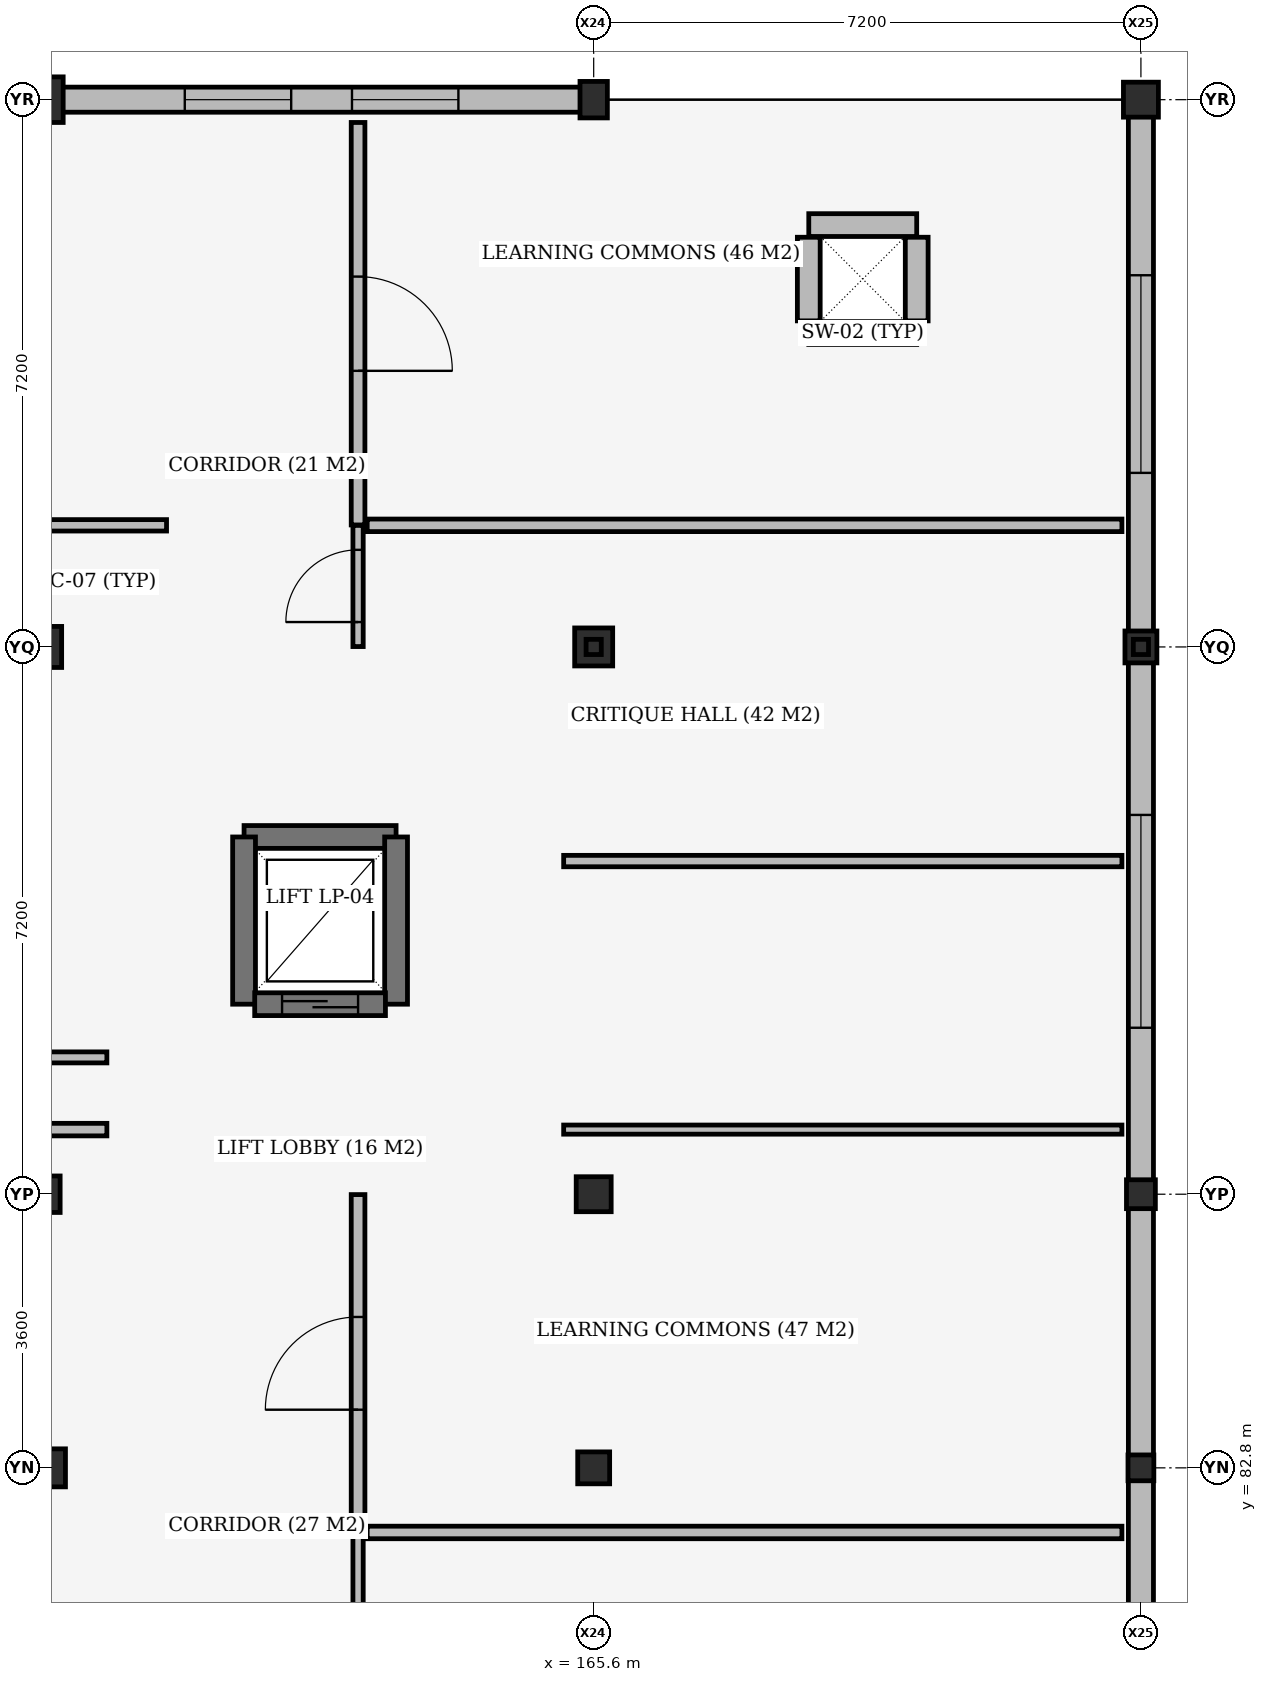
"""IFC4 building model, lengths in metres.
Left out: names, types, materials, properties, quantities, classifications, styles, units other than length and angle.
Written with IfcOpenShell. Run it as: python <this file> out.ifc"""

import sys

from ifc_helpers import new_model, si_unit, direction, frame, frame_2d, origin, origin_2d, place, context, subcontext, project, spatial, rectangle, i_section, extrude, element, fill, save


model = new_model("IFC4")
c1 = context("Model", 3, precision=1e-05, world=origin(), true_north=direction((0.0, 1.0)))
c2 = subcontext(c1, "Body", "Model", "MODEL_VIEW")
j1 = project(units=[si_unit("LENGTHUNIT", "METRE"), si_unit("PLANEANGLEUNIT", "RADIAN")], contexts=[c1])
p1 = place(None, origin())
s1 = spatial("IfcSite", under=j1, at=p1, CompositionType="ELEMENT")
p2 = place(p1, origin())
s2 = spatial("IfcBuilding", under=s1, at=p2, CompositionType="ELEMENT")
p3 = place(p2, frame((0.0, 0.0, 18.0)))
s3 = spatial("IfcBuildingStorey", under=s2, at=p3, CompositionType="ELEMENT", Elevation=18.0)
p4 = place(p3, frame((168.43, 97.73, 0.0), z_axis=(0.0, 0.0, 1.0), x_axis=(1.0, 0.0, 0.0)))
e1 = element("IfcWall", 1, at=p4, inside=s3, PredefinedType="SHEAR", context=c2, shape_type="SweptSolid", body=[
    extrude(rectangle(XDim=1.42, YDim=0.3, at=frame_2d((0.71, 0.0))), origin(), (0.0, 0.0, 1.0), 3.96),
])
p5 = place(p3, frame((169.85, 97.89, 0.0), z_axis=(0.0, 0.0, 1.0), x_axis=(0.0, 1.0, 0.0)))
e2 = element("IfcWall", 2, at=p5, inside=s3, PredefinedType="SHEAR", context=c2, shape_type="SweptSolid", body=[
    extrude(rectangle(XDim=1.1, YDim=0.3, at=frame_2d((0.55, 0.0))), origin(), (0.0, 0.0, 1.0), 3.96),
])
p6 = place(p3, frame((169.85, 99.15, 0.0), z_axis=(0.0, 0.0, 1.0), x_axis=(-1.0, 0.0, 0.0)))
e3 = element("IfcWall", 3, at=p6, inside=s3, PredefinedType="SHEAR", context=c2, shape_type="SweptSolid", body=[
    extrude(rectangle(XDim=1.42, YDim=0.3, at=frame_2d((0.71, 0.0))), origin(), (0.0, 0.0, 1.0), 3.96),
])
p7 = place(p3, frame((168.43, 98.99, 0.0), z_axis=(0.0, 0.0, 1.0), x_axis=(0.0, -1.0, 0.0)))
e4 = element("IfcWall", 4, at=p7, inside=s3, PredefinedType="SHEAR", context=c2, shape_type="SweptSolid", body=[
    extrude(rectangle(XDim=1.1, YDim=0.3, at=frame_2d((0.55, 0.0))), origin(), (0.0, 0.0, 1.0), 3.96),
])
p8 = place(p3, frame((158.4, 82.8, 0.0), z_axis=(0.0, 0.0, 1.0), x_axis=(1.0, 0.0, 0.0)))
e5 = element("IfcColumn", 5, at=p8, inside=s3, PredefinedType="COLUMN", context=c2, shape_type="SweptSolid", body=[
    extrude(rectangle(XDim=0.5, YDim=0.5, at=origin_2d()), origin(), (0.0, 0.0, 1.0), 3.96),
])
p9 = place(p3, frame((158.4, 86.4, 0.0), z_axis=(0.0, 0.0, 1.0), x_axis=(1.0, 0.0, 0.0)))
e6 = element("IfcColumn", 6, at=p9, inside=s3, PredefinedType="COLUMN", context=c2, shape_type="SweptSolid", body=[
    extrude(rectangle(XDim=0.36, YDim=0.48, at=origin_2d()), origin(), (0.0, 0.0, 1.0), 3.96),
])
p10 = place(p3, frame((158.4, 93.6, 0.0), z_axis=(0.0, 0.0, 1.0), x_axis=(1.0, 0.0, 0.0)))
e7 = element("IfcColumn", 7, at=p10, inside=s3, PredefinedType="COLUMN", context=c2, shape_type="SweptSolid", body=[
    extrude(rectangle(XDim=0.4, YDim=0.54, at=origin_2d()), origin(), (0.0, 0.0, 1.0), 3.96),
])
p11 = place(p3, frame((158.4, 100.8, 0.0), z_axis=(0.0, 0.0, 1.0), x_axis=(1.0, 0.0, 0.0)))
e8 = element("IfcColumn", 8, at=p11, inside=s3, PredefinedType="COLUMN", context=c2, shape_type="SweptSolid", body=[
    extrude(rectangle(XDim=0.44, YDim=0.6, at=origin_2d()), origin(), (0.0, 0.0, 1.0), 3.96),
])
p12 = place(p3, frame((165.6, 82.8, 0.0), z_axis=(0.0, 0.0, 1.0), x_axis=(1.0, 0.0, 0.0)))
e9 = element("IfcColumn", 9, at=p12, inside=s3, PredefinedType="COLUMN", context=c2, shape_type="SweptSolid", body=[
    extrude(rectangle(XDim=0.42, YDim=0.42, at=origin_2d()), origin(), (0.0, 0.0, 1.0), 3.96),
])
p13 = place(p3, frame((165.6, 86.4, 0.0), z_axis=(0.0, 0.0, 1.0), x_axis=(1.0, 0.0, 0.0)))
e10 = element("IfcColumn", 10, at=p13, inside=s3, PredefinedType="COLUMN", context=c2, shape_type="SweptSolid", body=[
    extrude(rectangle(XDim=0.46, YDim=0.46, at=origin_2d()), origin(), (0.0, 0.0, 1.0), 3.96),
])
p14 = place(p3, frame((165.6, 93.6, 0.0), z_axis=(0.0, 0.0, 1.0), x_axis=(1.0, 0.0, 0.0)))
e11 = element("IfcColumn", 11, at=p14, inside=s3, PredefinedType="COLUMN", context=c2, shape_type="SweptSolid", body=[
    extrude(rectangle(XDim=0.5, YDim=0.5, at=origin_2d()), origin(), (0.0, 0.0, 1.0), 3.96),
])
p15 = place(p3, frame((165.6, 100.8, 0.0), z_axis=(0.0, 0.0, 1.0), x_axis=(1.0, 0.0, 0.0)))
e12 = element("IfcColumn", 12, at=p15, inside=s3, PredefinedType="COLUMN", context=c2, shape_type="SweptSolid", body=[
    extrude(rectangle(XDim=0.36, YDim=0.48, at=origin_2d()), origin(), (0.0, 0.0, 1.0), 3.96),
])
p16 = place(p3, frame((172.8, 82.8, 0.0), z_axis=(0.0, 0.0, 1.0), x_axis=(1.0, 0.0, 0.0)))
e13 = element("IfcColumn", 13, at=p16, inside=s3, PredefinedType="COLUMN", context=c2, shape_type="SweptSolid", body=[
    extrude(rectangle(XDim=0.34, YDim=0.34, at=origin_2d()), origin(), (0.0, 0.0, 1.0), 3.96),
])
p17 = place(p3, frame((172.8, 86.4, 0.0), z_axis=(0.0, 0.0, 1.0), x_axis=(1.0, 0.0, 0.0)))
e14 = element("IfcColumn", 14, at=p17, inside=s3, PredefinedType="COLUMN", context=c2, shape_type="SweptSolid", body=[
    extrude(rectangle(XDim=0.38, YDim=0.38, at=origin_2d()), origin(), (0.0, 0.0, 1.0), 3.96),
])
p18 = place(p3, frame((172.8, 93.6, 0.0), z_axis=(0.0, 0.0, 1.0), x_axis=(1.0, 0.0, 0.0)))
e15 = element("IfcColumn", 15, at=p18, inside=s3, PredefinedType="COLUMN", context=c2, shape_type="SweptSolid", body=[
    extrude(rectangle(XDim=0.42, YDim=0.42, at=origin_2d()), origin(), (0.0, 0.0, 1.0), 3.96),
])
p19 = place(p3, frame((172.8, 100.8, 0.0), z_axis=(0.0, 0.0, 1.0), x_axis=(1.0, 0.0, 0.0)))
e16 = element("IfcColumn", 16, at=p19, inside=s3, PredefinedType="COLUMN", context=c2, shape_type="SweptSolid", body=[
    extrude(rectangle(XDim=0.46, YDim=0.46, at=origin_2d()), origin(), (0.0, 0.0, 1.0), 3.96),
])
p20 = place(p3, frame((163.0, 91.1, 0.0), z_axis=(0.0, 0.0, 1.0), x_axis=(-1.0, 0.0, 0.0)))
e17 = element("IfcWall", 17, at=p20, inside=s3, PredefinedType="SHEAR", context=c2, shape_type="SweptSolid", body=[
    extrude(rectangle(XDim=2.0, YDim=0.3, at=frame_2d((1.0, 0.0))), origin(), (0.0, 0.0, 1.0), 3.64),
])
for number, where, z_axis, x_axis in (
    (18, (161.0, 91.1, 0.0), (0.0, 0.0, 1.0), (0.0, -1.0, 0.0)),
    (19, (163.0, 88.9, 0.0), (0.0, 0.0, 1.0), (0.0, 1.0, 0.0)),
):
    element("IfcWall", number, at=place(p3, frame(where, z_axis=z_axis, x_axis=x_axis)), inside=s3, PredefinedType="SHEAR", context=c2, shape_type="SweptSolid", body=[
        extrude(rectangle(XDim=2.2, YDim=0.3, at=frame_2d((1.1, 0.0))), origin(), (0.0, 0.0, 1.0), 3.64),
    ])
for number, where, z_axis, x_axis in (
    (20, (165.6, 93.6, 3.96), (0.0, 0.0, 1.0), (1.0, 0.0, 0.0)),
    (21, (172.8, 93.6, 3.96), (0.0, 0.0, 1.0), (1.0, 0.0, 0.0)),
):
    element("IfcColumn", number, at=place(p3, frame(where, z_axis=z_axis, x_axis=x_axis)), inside=s3, PredefinedType="COLUMN", context=c2, shape_type="SweptSolid", body=[
        extrude(i_section(OverallWidth=0.2, OverallDepth=0.2, WebThickness=0.009, FlangeThickness=0.015, FilletRadius=0.018, at=origin_2d()), origin(), (0.0, 0.0, 1.0), 2.04),
    ])
p21 = place(p3, frame((158.612, 100.8, 0.0), z_axis=(0.0, 0.0, 1.0), x_axis=(1.0, 0.0, 0.0)))
e22 = element("IfcWall", 22, at=p21, inside=s3, PredefinedType="STANDARD", context=c2, shape_type="SweptSolid", body=[
    extrude(rectangle(XDim=6.816, YDim=0.33, at=frame_2d((3.408, 0.0))), origin(), (0.0, 0.0, 1.0), 3.96),
])
p22 = place(p21, frame((1.608, 0.0, 0.85)))
e23 = element("IfcOpeningElement", 23, at=p22, cuts=e22, PredefinedType="OPENING", context=c2, shape_type="SweptSolid", body=[
    extrude(rectangle(XDim=1.4, YDim=2.6, at=frame_2d((0.7, 1.3))), frame((0.0, 0.175, 0.0), z_axis=(0.0, -1.0, 0.0), x_axis=(1.0, 0.0, 0.0)), (0.0, 0.0, 1.0), 0.35),
])
p23 = place(p21, frame((3.808, 0.0, 0.85)))
e24 = element("IfcOpeningElement", 24, at=p23, cuts=e22, PredefinedType="OPENING", context=c2, shape_type="SweptSolid", body=[
    extrude(rectangle(XDim=1.4, YDim=2.6, at=frame_2d((0.7, 1.3))), frame((0.0, 0.175, 0.0), z_axis=(0.0, -1.0, 0.0), x_axis=(1.0, 0.0, 0.0)), (0.0, 0.0, 1.0), 0.35),
])
p24 = place(p3, frame((172.8, 82.638, 0.0), z_axis=(0.0, 0.0, 1.0), x_axis=(0.0, -1.0, 0.0)))
e25 = element("IfcWall", 25, at=p24, inside=s3, PredefinedType="STANDARD", context=c2, shape_type="SweptSolid", body=[
    extrude(rectangle(XDim=6.746, YDim=0.33, at=frame_2d((3.373, 0.0))), origin(), (0.0, 0.0, 1.0), 3.96),
])
p25 = place(p24, frame((2.073, 0.0, 0.85)))
e26 = element("IfcOpeningElement", 26, at=p25, cuts=e25, PredefinedType="OPENING", context=c2, shape_type="SweptSolid", body=[
    extrude(rectangle(XDim=2.6, YDim=2.4, at=frame_2d((1.3, 1.2))), frame((0.0, 0.175, 0.0), z_axis=(0.0, -1.0, 0.0), x_axis=(1.0, 0.0, 0.0)), (0.0, 0.0, 1.0), 0.35),
])
p26 = place(p3, frame((172.8, 86.218, 0.0), z_axis=(0.0, 0.0, 1.0), x_axis=(0.0, -1.0, 0.0)))
e27 = element("IfcWall", 27, at=p26, inside=s3, PredefinedType="STANDARD", context=c2, shape_type="SweptSolid", body=[
    extrude(rectangle(XDim=3.256, YDim=0.33, at=frame_2d((1.628, 0.0))), origin(), (0.0, 0.0, 1.0), 3.96),
])
p27 = place(p3, frame((172.8, 93.398, 0.0), z_axis=(0.0, 0.0, 1.0), x_axis=(0.0, -1.0, 0.0)))
e28 = element("IfcWall", 28, at=p27, inside=s3, PredefinedType="STANDARD", context=c2, shape_type="SweptSolid", body=[
    extrude(rectangle(XDim=6.816, YDim=0.33, at=frame_2d((3.408, 0.0))), origin(), (0.0, 0.0, 1.0), 3.96),
])
p28 = place(p27, frame((2.008, 0.0, 0.85)))
e29 = element("IfcOpeningElement", 29, at=p28, cuts=e28, PredefinedType="OPENING", context=c2, shape_type="SweptSolid", body=[
    extrude(rectangle(XDim=2.8, YDim=2.4, at=frame_2d((1.4, 1.2))), frame((0.0, 0.175, 0.0), z_axis=(0.0, -1.0, 0.0), x_axis=(1.0, 0.0, 0.0)), (0.0, 0.0, 1.0), 0.35),
])
p29 = place(p3, frame((172.8, 100.578, 0.0), z_axis=(0.0, 0.0, 1.0), x_axis=(0.0, -1.0, 0.0)))
e30 = element("IfcWall", 30, at=p29, inside=s3, PredefinedType="STANDARD", context=c2, shape_type="SweptSolid", body=[
    extrude(rectangle(XDim=6.776, YDim=0.33, at=frame_2d((3.388, 0.0))), origin(), (0.0, 0.0, 1.0), 3.96),
])
p30 = place(p29, frame((2.088, 0.0, 0.85)))
e31 = element("IfcOpeningElement", 31, at=p30, cuts=e30, PredefinedType="OPENING", context=c2, shape_type="SweptSolid", body=[
    extrude(rectangle(XDim=2.6, YDim=2.4, at=frame_2d((1.3, 1.2))), frame((0.0, 0.175, 0.0), z_axis=(0.0, -1.0, 0.0), x_axis=(1.0, 0.0, 0.0)), (0.0, 0.0, 1.0), 0.35),
])
p31 = place(p3, frame((162.86, 88.9, 0.0), z_axis=(0.0, 0.0, 1.0), x_axis=(-1.0, 0.0, 0.0)))
e32 = element("IfcWall", 32, at=p31, inside=s3, PredefinedType="SHEAR", context=c2, shape_type="SweptSolid", body=[
    extrude(rectangle(XDim=1.72, YDim=0.3, at=frame_2d((0.86, 0.0))), origin(), (0.0, 0.0, 1.0), 5.1),
])
p32 = place(p31, frame((0.36, 0.0, 0.0)))
e33 = element("IfcOpeningElement", 33, at=p32, cuts=e32, PredefinedType="OPENING", context=c2, shape_type="SweptSolid", body=[
    extrude(rectangle(XDim=1.0, YDim=2.1, at=frame_2d((0.5, 1.05))), frame((0.0, 0.16, 0.0), z_axis=(0.0, -1.0, 0.0), x_axis=(1.0, 0.0, 0.0)), (0.0, 0.0, 1.0), 0.32),
])
p33 = place(p3, frame((136.885, 87.25, 0.0), z_axis=(0.0, 0.0, 1.0), x_axis=(1.0, 0.0, 0.0)))
e34 = element("IfcWall", 34, at=p33, inside=s3, PredefinedType="PARTITIONING", context=c2, shape_type="SweptSolid", body=[
    extrude(rectangle(XDim=22.31, YDim=0.165, at=frame_2d((11.155, 0.0))), origin(), (0.0, 0.0, 1.0), 3.96),
])
p34 = place(p3, frame((137.205, 95.2, 0.0), z_axis=(0.0, 0.0, 1.0), x_axis=(1.0, 0.0, 0.0)))
e35 = element("IfcWall", 35, at=p34, inside=s3, PredefinedType="PARTITIONING", context=c2, shape_type="SweptSolid", body=[
    extrude(rectangle(XDim=22.775, YDim=0.15, at=frame_2d((11.387, 0.0))), origin(), (0.0, 0.0, 1.0), 3.96),
])
p35 = place(p3, frame((162.5, 77.538, 0.0), z_axis=(0.0, 0.0, 1.0), x_axis=(0.0, 1.0, 0.0)))
e36 = element("IfcWall", 36, at=p35, inside=s3, PredefinedType="PARTITIONING", context=c2, shape_type="SweptSolid", body=[
    extrude(rectangle(XDim=4.412, YDim=0.135, at=frame_2d((2.206, 0.0))), origin(), (0.0, 0.0, 1.0), 3.96),
])
p36 = place(p35, frame((1.626, 0.0, 0.0)))
e37 = element("IfcOpeningElement", 37, at=p36, cuts=e36, PredefinedType="OPENING", context=c2, shape_type="SweptSolid", body=[
    extrude(rectangle(XDim=1.16, YDim=2.2, at=frame_2d((0.58, 1.1))), frame((0.0, 0.077, 0.0), z_axis=(0.0, -1.0, 0.0), x_axis=(1.0, 0.0, 0.0)), (0.0, 0.0, 1.0), 0.155),
])
p37 = place(p3, frame((162.62, 81.95, 0.0), z_axis=(0.0, 0.0, 1.0), x_axis=(1.0, 0.0, 0.0)))
e38 = element("IfcWall", 38, at=p37, inside=s3, PredefinedType="PARTITIONING", context=c2, shape_type="SweptSolid", body=[
    extrude(rectangle(XDim=9.93, YDim=0.165, at=frame_2d((4.965, 0.0))), origin(), (0.0, 0.0, 1.0), 3.96),
])
p38 = place(p3, frame((162.5, 81.955, 0.0), z_axis=(0.0, 0.0, 1.0), x_axis=(0.0, 1.0, 0.0)))
e39 = element("IfcWall", 39, at=p38, inside=s3, PredefinedType="PARTITIONING", context=c2, shape_type="SweptSolid", body=[
    extrude(rectangle(XDim=4.44, YDim=0.18, at=frame_2d((2.22, 0.0))), origin(), (0.0, 0.0, 1.0), 3.96),
])
p39 = place(p38, frame((1.61, 0.0, 0.0)))
e40 = element("IfcOpeningElement", 40, at=p39, cuts=e39, PredefinedType="OPENING", context=c2, shape_type="SweptSolid", body=[
    extrude(rectangle(XDim=1.22, YDim=2.25, at=frame_2d((0.61, 1.125))), frame((0.0, 0.1, 0.0), z_axis=(0.0, -1.0, 0.0), x_axis=(1.0, 0.0, 0.0)), (0.0, 0.0, 1.0), 0.2),
])
p40 = place(p3, frame((165.205, 87.25, 0.0), z_axis=(0.0, 0.0, 1.0), x_axis=(1.0, 0.0, 0.0)))
e41 = element("IfcWall", 41, at=p40, inside=s3, PredefinedType="PARTITIONING", context=c2, shape_type="SweptSolid", body=[
    extrude(rectangle(XDim=7.345, YDim=0.12, at=frame_2d((3.672, 0.0))), origin(), (0.0, 0.0, 1.0), 3.96),
])
p41 = place(p3, frame((162.5, 93.605, 0.0), z_axis=(0.0, 0.0, 1.0), x_axis=(0.0, 1.0, 0.0)))
e42 = element("IfcWall", 42, at=p41, inside=s3, PredefinedType="PARTITIONING", context=c2, shape_type="SweptSolid", body=[
    extrude(rectangle(XDim=1.595, YDim=0.135, at=frame_2d((0.797, 0.0))), origin(), (0.0, 0.0, 1.0), 3.96),
])
p42 = place(p41, frame((0.323, 0.0, 0.0)))
e43 = element("IfcOpeningElement", 43, at=p42, cuts=e42, PredefinedType="OPENING", context=c2, shape_type="SweptSolid", body=[
    extrude(rectangle(XDim=0.95, YDim=2.15, at=frame_2d((0.475, 1.075))), frame((0.0, 0.077, 0.0), z_axis=(0.0, -1.0, 0.0), x_axis=(1.0, 0.0, 0.0)), (0.0, 0.0, 1.0), 0.155),
])
p43 = place(p3, frame((165.205, 90.783, 0.0), z_axis=(0.0, 0.0, 1.0), x_axis=(1.0, 0.0, 0.0)))
e44 = element("IfcWall", 44, at=p43, inside=s3, PredefinedType="PARTITIONING", context=c2, shape_type="SweptSolid", body=[
    extrude(rectangle(XDim=7.345, YDim=0.15, at=frame_2d((3.672, 0.0))), origin(), (0.0, 0.0, 1.0), 3.96),
])
p44 = place(p3, frame((162.62, 95.2, 0.0), z_axis=(0.0, 0.0, 1.0), x_axis=(1.0, 0.0, 0.0)))
e45 = element("IfcWall", 45, at=p44, inside=s3, PredefinedType="PARTITIONING", context=c2, shape_type="SweptSolid", body=[
    extrude(rectangle(XDim=9.93, YDim=0.165, at=frame_2d((4.965, 0.0))), origin(), (0.0, 0.0, 1.0), 3.96),
])
p45 = place(p3, frame((162.5, 95.205, 0.0), z_axis=(0.0, 0.0, 1.0), x_axis=(0.0, 1.0, 0.0)))
e46 = element("IfcWall", 46, at=p45, inside=s3, PredefinedType="PARTITIONING", context=c2, shape_type="SweptSolid", body=[
    extrude(rectangle(XDim=5.295, YDim=0.18, at=frame_2d((2.647, 0.0))), origin(), (0.0, 0.0, 1.0), 3.96),
])
p46 = place(p45, frame((2.028, 0.0, 0.0)))
e47 = element("IfcOpeningElement", 47, at=p46, cuts=e46, PredefinedType="OPENING", context=c2, shape_type="SweptSolid", body=[
    extrude(rectangle(XDim=1.24, YDim=2.25, at=frame_2d((0.62, 1.125))), frame((0.0, 0.1, 0.0), z_axis=(0.0, -1.0, 0.0), x_axis=(1.0, 0.0, 0.0)), (0.0, 0.0, 1.0), 0.2),
])
p47 = place(p3, frame((137.205, 88.2, 0.0), z_axis=(0.0, 0.0, 1.0), x_axis=(1.0, 0.0, 0.0)))
e48 = element("IfcWall", 48, at=p47, inside=s3, PredefinedType="PLUMBINGWALL", context=c2, shape_type="SweptSolid", body=[
    extrude(rectangle(XDim=21.99, YDim=0.145, at=frame_2d((10.995, 0.0))), origin(), (0.0, 0.0, 1.0), 3.96),
])
p48 = place(p47, frame((10.545, 0.0, 0.0)))
e49 = element("IfcOpeningElement", 49, at=p48, cuts=e48, PredefinedType="OPENING", context=c2, shape_type="SweptSolid", body=[
    extrude(rectangle(XDim=0.9, YDim=2.1, at=frame_2d((0.45, 1.05))), frame((0.0, 0.083, 0.0), z_axis=(0.0, -1.0, 0.0), x_axis=(1.0, 0.0, 0.0)), (0.0, 0.0, 1.0), 0.165),
])
p49 = place(p22, origin())
e50 = element("IfcWindow", 50, at=p49, inside=s3, PartitioningType="DOUBLE_PANEL_VERTICAL", PredefinedType="WINDOW", context=c2, shape_type="SweptSolid", body=[
    extrude(rectangle(XDim=1.4, YDim=2.6, at=frame_2d((0.7, 1.3))), frame((0.0, 0.03, 0.0), z_axis=(0.0, -1.0, 0.0), x_axis=(1.0, 0.0, 0.0)), (0.0, 0.0, 1.0), 0.06),
])
fill(e23, e50)
p50 = place(p23, origin())
e51 = element("IfcWindow", 51, at=p50, inside=s3, PartitioningType="DOUBLE_PANEL_VERTICAL", PredefinedType="WINDOW", context=c2, shape_type="SweptSolid", body=[
    extrude(rectangle(XDim=1.4, YDim=2.6, at=frame_2d((0.7, 1.3))), frame((0.0, 0.03, 0.0), z_axis=(0.0, -1.0, 0.0), x_axis=(1.0, 0.0, 0.0)), (0.0, 0.0, 1.0), 0.06),
])
fill(e24, e51)
p51 = place(p28, origin())
e52 = element("IfcWindow", 52, at=p51, inside=s3, PartitioningType="DOUBLE_PANEL_VERTICAL", PredefinedType="WINDOW", context=c2, shape_type="SweptSolid", body=[
    extrude(rectangle(XDim=2.8, YDim=2.4, at=frame_2d((1.4, 1.2))), frame((0.0, 0.03, 0.0), z_axis=(0.0, -1.0, 0.0), x_axis=(1.0, 0.0, 0.0)), (0.0, 0.0, 1.0), 0.06),
])
fill(e29, e52)
p52 = place(p30, origin())
e53 = element("IfcWindow", 53, at=p52, inside=s3, PartitioningType="DOUBLE_PANEL_VERTICAL", PredefinedType="WINDOW", context=c2, shape_type="SweptSolid", body=[
    extrude(rectangle(XDim=2.6, YDim=2.4, at=frame_2d((1.3, 1.2))), frame((0.0, 0.03, 0.0), z_axis=(0.0, -1.0, 0.0), x_axis=(1.0, 0.0, 0.0)), (0.0, 0.0, 1.0), 0.06),
])
fill(e31, e53)
p53 = place(p32, origin())
e54 = element("IfcDoor", 54, at=p53, inside=s3, OperationType="SLIDING_TO_LEFT", PredefinedType="DOOR", context=c2, shape_type="SweptSolid", body=[
    extrude(rectangle(XDim=1.0, YDim=2.1, at=frame_2d((0.5, 1.05))), frame((0.0, 0.025, 0.0), z_axis=(0.0, -1.0, 0.0), x_axis=(1.0, 0.0, 0.0)), (0.0, 0.0, 1.0), 0.05),
])
fill(e33, e54)
p54 = place(p39, origin())
e55 = element("IfcDoor", 55, at=p54, inside=s3, OperationType="SINGLE_SWING_LEFT", PredefinedType="DOOR", context=c2, shape_type="SweptSolid", body=[
    extrude(rectangle(XDim=1.22, YDim=2.25, at=frame_2d((0.61, 1.125))), frame((0.0, 0.025, 0.0), z_axis=(0.0, -1.0, 0.0), x_axis=(1.0, 0.0, 0.0)), (0.0, 0.0, 1.0), 0.05),
])
fill(e40, e55)
p55 = place(p42, origin())
e56 = element("IfcDoor", 56, at=p55, inside=s3, OperationType="SINGLE_SWING_LEFT", PredefinedType="DOOR", context=c2, shape_type="SweptSolid", body=[
    extrude(rectangle(XDim=0.95, YDim=2.15, at=frame_2d((0.475, 1.075))), frame((0.0, 0.025, 0.0), z_axis=(0.0, -1.0, 0.0), x_axis=(1.0, 0.0, 0.0)), (0.0, 0.0, 1.0), 0.05),
])
fill(e43, e56)
p56 = place(p46, origin())
e57 = element("IfcDoor", 57, at=p56, inside=s3, OperationType="SINGLE_SWING_RIGHT", PredefinedType="DOOR", context=c2, shape_type="SweptSolid", body=[
    extrude(rectangle(XDim=1.24, YDim=2.25, at=frame_2d((0.62, 1.125))), frame((0.0, 0.025, 0.0), z_axis=(0.0, -1.0, 0.0), x_axis=(1.0, 0.0, 0.0)), (0.0, 0.0, 1.0), 0.05),
])
fill(e47, e57)
save(model, sys.argv[1])
